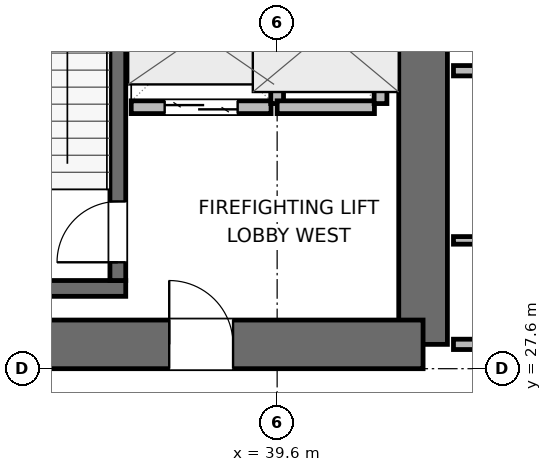
"""IFC4 building model, lengths in metres.
Left out: names, types, materials, properties, quantities, classifications, styles, units other than length and angle.
Written with IfcOpenShell. Run it as: python <this file> out.ifc"""

import sys

from ifc_helpers import new_model, si_unit, direction, frame, frame_2d, origin, place, context, subcontext, project, spatial, rectangle, extrude, element, fill, save


model = new_model("IFC4")
c1 = context("Model", 3, precision=1e-05, world=origin(), true_north=direction((0.0, 1.0)))
c2 = subcontext(c1, "Body", "Model", "MODEL_VIEW")
j1 = project(units=[si_unit("LENGTHUNIT", "METRE"), si_unit("PLANEANGLEUNIT", "RADIAN")], contexts=[c1])
p1 = place(None, origin())
s1 = spatial("IfcSite", under=j1, at=p1, CompositionType="ELEMENT")
p2 = place(p1, origin())
s2 = spatial("IfcBuilding", under=s1, at=p2, CompositionType="ELEMENT")
p3 = place(p2, frame((0.0, 0.0, 166.2)))
s3 = spatial("IfcBuildingStorey", under=s2, at=p3, CompositionType="ELEMENT", Elevation=166.2)
p4 = place(p3, frame((42.0, 28.0, 0.0), z_axis=(0.0, 0.0, 1.0), x_axis=(0.0, 1.0, 0.0)))
e1 = element("IfcWall", 1, at=p4, inside=s3, PredefinedType="SHEAR", context=c2, shape_type="SweptSolid", body=[
    extrude(rectangle(XDim=6.4, YDim=0.8, at=frame_2d((3.2, 0.0))), origin(), (0.0, 0.0, 1.0), 3.9),
])
p5 = place(p3, frame((32.8, 28.0, 0.0), z_axis=(0.0, 0.0, 1.0), x_axis=(1.0, 0.0, 0.0)))
e2 = element("IfcWall", 2, at=p5, inside=s3, PredefinedType="SHEAR", context=c2, shape_type="SweptSolid", body=[
    extrude(rectangle(XDim=9.2, YDim=0.8, at=frame_2d((4.6, 0.0))), origin(), (0.0, 0.0, 1.0), 3.9),
])
p6 = place(p5, frame((5.025, 0.0, 0.0)))
e3 = element("IfcOpeningElement", 3, at=p6, cuts=e2, PredefinedType="OPENING", context=c2, shape_type="SweptSolid", body=[
    extrude(rectangle(XDim=1.05, YDim=2.04, at=frame_2d((0.525, 1.02))), frame((0.0, 0.41, 0.0), z_axis=(0.0, -1.0, 0.0), x_axis=(1.0, 0.0, 0.0)), (0.0, 0.0, 1.0), 0.82),
])
p7 = place(p3, frame((33.2, 28.92, 0.0), z_axis=(0.0, 0.0, 1.0), x_axis=(1.0, 0.0, 0.0)))
e4 = element("IfcWall", 4, at=p7, inside=s3, PredefinedType="SHEAR", context=c2, shape_type="SweptSolid", body=[
    extrude(rectangle(XDim=3.91, YDim=0.26, at=frame_2d((1.955, 0.0))), origin(), (0.0, 0.0, 1.0), 3.9),
])
p8 = place(p3, frame((36.98, 29.05, 0.0), z_axis=(0.0, 0.0, 1.0), x_axis=(0.0, 1.0, 0.0)))
e5 = element("IfcWall", 5, at=p8, inside=s3, PredefinedType="SHEAR", context=c2, shape_type="SweptSolid", body=[
    extrude(rectangle(XDim=7.6, YDim=0.26, at=frame_2d((3.8, 0.0))), origin(), (0.0, 0.0, 1.0), 3.9),
])
p9 = place(p8, frame((0.3, 0.0, 0.0)))
e6 = element("IfcOpeningElement", 6, at=p9, cuts=e5, PredefinedType="OPENING", context=c2, shape_type="SweptSolid", body=[
    extrude(rectangle(XDim=1.0, YDim=2.04, at=frame_2d((0.5, 1.02))), frame((0.0, 0.14, 0.0), z_axis=(0.0, -1.0, 0.0), x_axis=(1.0, 0.0, 0.0)), (0.0, 0.0, 1.0), 0.28),
])
p10 = place(p3, frame((37.2, 31.9, 0.0), z_axis=(0.0, 0.0, 1.0), x_axis=(1.0, 0.0, 0.0)))
e7 = element("IfcWall", 7, at=p10, inside=s3, PredefinedType="PARTITIONING", context=c2, shape_type="SweptSolid", body=[
    extrude(rectangle(XDim=2.3, YDim=0.21, at=frame_2d((1.15, 0.0))), origin(), (0.0, 0.0, 1.0), 3.68),
])
p11 = place(p10, frame((0.55, 0.0, 0.0)))
e8 = element("IfcOpeningElement", 8, at=p11, cuts=e7, PredefinedType="OPENING", context=c2, shape_type="SweptSolid", body=[
    extrude(rectangle(XDim=1.2, YDim=2.04, at=frame_2d((0.6, 1.02))), frame((0.0, 0.115, 0.0), z_axis=(0.0, -1.0, 0.0), x_axis=(1.0, 0.0, 0.0)), (0.0, 0.0, 1.0), 0.23),
])
p12 = place(p3, frame((39.6, 31.96, 0.0), z_axis=(0.0, 0.0, 1.0), x_axis=(0.0, 1.0, 0.0)))
e9 = element("IfcWall", 9, at=p12, inside=s3, PredefinedType="PARTITIONING", context=c2, shape_type="SweptSolid", body=[
    extrude(rectangle(XDim=2.28, YDim=0.21, at=frame_2d((1.14, 0.0))), origin(), (0.0, 0.0, 1.0), 3.68),
])
p13 = place(p3, frame((39.6, 31.9, 0.0), z_axis=(0.0, 0.0, 1.0), x_axis=(1.0, 0.0, 0.0)))
e10 = element("IfcWall", 10, at=p13, inside=s3, PredefinedType="PARTITIONING", context=c2, shape_type="SweptSolid", body=[
    extrude(rectangle(XDim=1.6, YDim=0.21, at=frame_2d((0.8, 0.0))), origin(), (0.0, 0.0, 1.0), 3.68),
])
p14 = place(p3, frame((41.3, 31.96, 0.0), z_axis=(0.0, 0.0, 1.0), x_axis=(0.0, 1.0, 0.0)))
e11 = element("IfcWall", 11, at=p14, inside=s3, PredefinedType="PARTITIONING", context=c2, shape_type="SweptSolid", body=[
    extrude(rectangle(XDim=2.38, YDim=0.21, at=frame_2d((1.19, 0.0))), origin(), (0.0, 0.0, 1.0), 3.68),
])
p15 = place(p3, frame((42.5, 28.0, 0.0), z_axis=(0.0, 0.0, 1.0), x_axis=(1.0, 0.0, 0.0)))
e12 = element("IfcWall", 12, at=p15, inside=s3, PredefinedType="PARTITIONING", context=c2, shape_type="SweptSolid", body=[
    extrude(rectangle(XDim=4.213, YDim=0.17, at=frame_2d((2.106, 0.0))), origin(), (0.0, 0.0, 1.0), 2.765),
])
p16 = place(p3, frame((42.5, 32.5, 0.0), z_axis=(0.0, 0.0, 1.0), x_axis=(1.0, 0.0, 0.0)))
e13 = element("IfcWall", 13, at=p16, inside=s3, PredefinedType="PARTITIONING", context=c2, shape_type="SweptSolid", body=[
    extrude(rectangle(XDim=1.3, YDim=0.17, at=frame_2d((0.65, 0.0))), origin(), (0.0, 0.0, 1.0), 3.68),
])
p17 = place(p3, frame((42.5, 29.71, 0.0), z_axis=(0.0, 0.0, 1.0), x_axis=(1.0, 0.0, 0.0)))
e14 = element("IfcWall", 14, at=p17, inside=s3, PredefinedType="PARTITIONING", context=c2, shape_type="SweptSolid", body=[
    extrude(rectangle(XDim=4.213, YDim=0.125, at=frame_2d((2.106, 0.0))), origin(), (0.0, 0.0, 1.0), 3.68),
])
p18 = place(p9, origin())
e15 = element("IfcDoor", 15, at=p18, inside=s3, OperationType="SINGLE_SWING_LEFT", PredefinedType="DOOR", context=c2, shape_type="SweptSolid", body=[
    extrude(rectangle(XDim=1.0, YDim=2.04, at=frame_2d((0.5, 1.02))), frame((0.0, 0.025, 0.0), z_axis=(0.0, -1.0, 0.0), x_axis=(1.0, 0.0, 0.0)), (0.0, 0.0, 1.0), 0.05),
])
fill(e6, e15)
p19 = place(p11, origin())
e16 = element("IfcDoor", 16, at=p19, inside=s3, OperationType="DOUBLE_DOOR_SLIDING", PredefinedType="DOOR", context=c2, shape_type="SweptSolid", body=[
    extrude(rectangle(XDim=1.2, YDim=2.04, at=frame_2d((0.6, 1.02))), frame((0.0, 0.025, 0.0), z_axis=(0.0, -1.0, 0.0), x_axis=(1.0, 0.0, 0.0)), (0.0, 0.0, 1.0), 0.05),
])
fill(e8, e16)
p20 = place(p6, origin())
e17 = element("IfcDoor", 17, at=p20, inside=s3, OperationType="SINGLE_SWING_LEFT", PredefinedType="DOOR", context=c2, shape_type="SweptSolid", body=[
    extrude(rectangle(XDim=1.05, YDim=2.04, at=frame_2d((0.525, 1.02))), frame((0.0, 0.025, 0.0), z_axis=(0.0, -1.0, 0.0), x_axis=(1.0, 0.0, 0.0)), (0.0, 0.0, 1.0), 0.05),
])
fill(e3, e17)
save(model, sys.argv[1])
